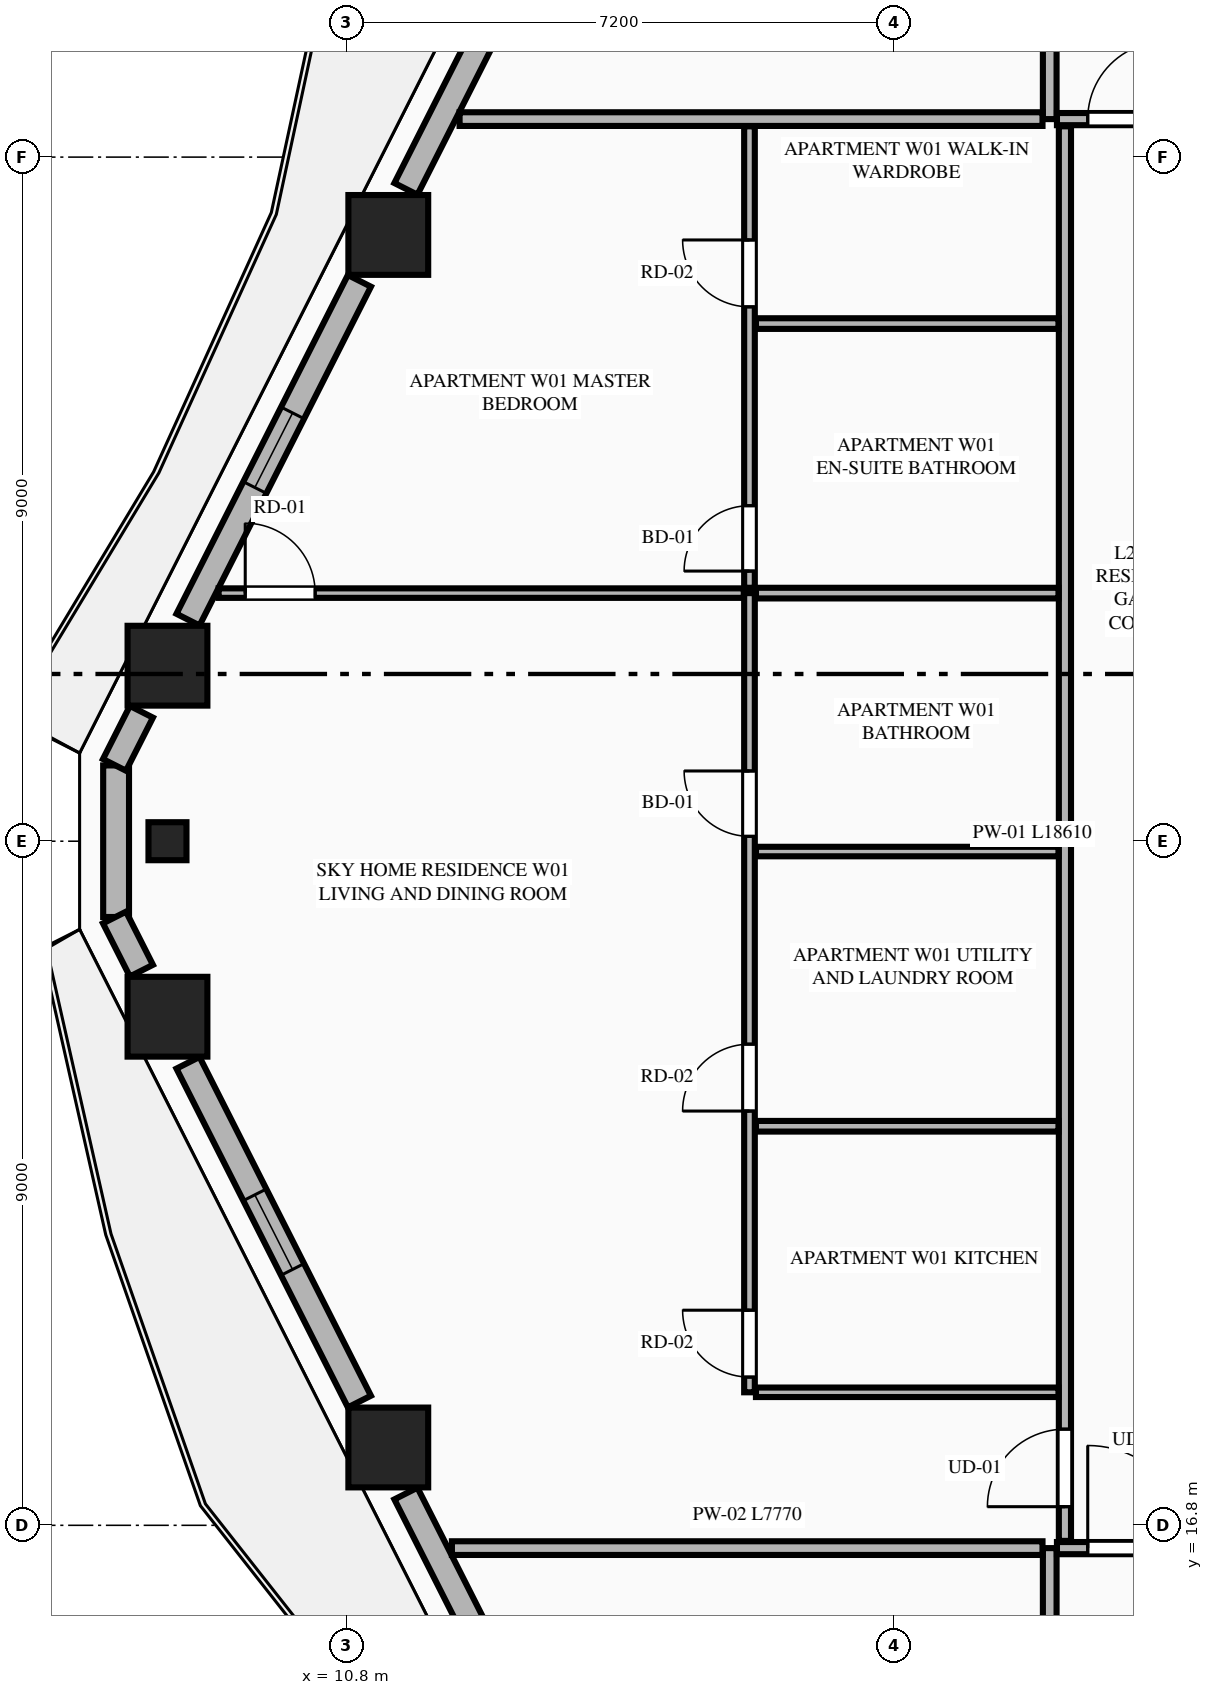
"""IFC4 building model, lengths in metres.
Left out: names, types, materials, properties, quantities, classifications, styles, units other than length and angle.
Written with IfcOpenShell. Run it as: python <this file> out.ifc"""

import sys

from ifc_helpers import new_model, si_unit, direction, frame, frame_2d, origin, origin_2d, place, context, subcontext, project, spatial, rectangle, extrude, element, fill, save


model = new_model("IFC4")
c1 = context("Model", 3, precision=1e-05, world=origin(), true_north=direction((0.0, 1.0)))
c2 = subcontext(c1, "Body", "Model", "MODEL_VIEW")
j1 = project(units=[si_unit("LENGTHUNIT", "METRE"), si_unit("PLANEANGLEUNIT", "RADIAN")], contexts=[c1])
p1 = place(None, origin())
s1 = spatial("IfcSite", under=j1, at=p1, CompositionType="ELEMENT")
p2 = place(p1, origin())
s2 = spatial("IfcBuilding", under=s1, at=p2, CompositionType="ELEMENT")
p3 = place(p2, frame((0.0, 0.0, 101.95)))
s3 = spatial("IfcBuildingStorey", under=s2, at=p3, CompositionType="ELEMENT", Elevation=101.95)
for number, where, z_axis, x_axis in (
    (1, (11.348, 33.776, 0.0), (0.0, 0.0, 1.0), (1.0, 0.0, 0.0)),
    (2, (8.443, 28.109, 0.0), (0.0, 0.0, 1.0), (1.0, 0.0, 0.0)),
    (3, (8.443, 23.491, 0.0), (0.0, 0.0, 1.0), (1.0, 0.0, 0.0)),
    (4, (11.348, 17.824, 0.0), (0.0, 0.0, 1.0), (1.0, 0.0, 0.0)),
):
    element("IfcColumn", number, at=place(p3, frame(where, z_axis=z_axis, x_axis=x_axis)), inside=s3, PredefinedType="COLUMN", context=c2, shape_type="SweptSolid", body=[
        extrude(rectangle(XDim=1.05, YDim=1.05, at=origin_2d()), origin(), (0.0, 0.0, 1.0), 3.55),
    ])
p4 = place(p3, frame((8.443, 25.8, 0.0), z_axis=(0.0, 0.0, 1.0), x_axis=(0.0, -1.0, 0.0)))
e5 = element("IfcColumn", 5, at=p4, inside=s3, PredefinedType="PILASTER", context=c2, shape_type="SweptSolid", body=[
    extrude(rectangle(XDim=0.5, YDim=0.35, at=origin_2d()), origin(), (0.0, 0.0, 1.0), 3.55),
])
p5 = place(p3, frame((7.767, 26.797, 0.0), z_axis=(0.0, 0.0, 1.0), x_axis=(0.0, -1.0, 0.0)))
e6 = element("IfcWall", 6, at=p5, inside=s3, PredefinedType="STANDARD", context=c2, shape_type="SweptSolid", body=[
    extrude(rectangle(XDim=1.994, YDim=0.34, at=frame_2d((0.997, 0.0))), origin(), (0.0, 0.0, 1.0), 3.34),
])
p6 = place(p3, frame((13.937, 39.039, 0.0), z_axis=(0.0, 0.0, 1.0), x_axis=(-0.451567731634, -0.892236842855, 0.0)))
e7 = element("IfcWall", 7, at=p6, inside=s3, PredefinedType="STANDARD", context=c2, shape_type="SweptSolid", body=[
    extrude(rectangle(XDim=5.219, YDim=0.34, at=frame_2d((2.61, 0.0))), origin(), (0.0, 0.0, 1.0), 2.797),
])
p7 = place(p6, frame((1.42, 0.0, 0.0)))
e8 = element("IfcOpeningElement", 8, at=p7, cuts=e7, PredefinedType="OPENING", context=c2, shape_type="SweptSolid", body=[
    extrude(rectangle(XDim=1.1, YDim=2.25, at=frame_2d((0.55, 1.125))), frame((0.0, 0.18, 0.0), z_axis=(0.0, -1.0, 0.0), x_axis=(1.0, 0.0, 0.0)), (0.0, 0.0, 1.0), 0.36),
])
p8 = place(p3, frame((10.968, 33.172, 0.0), z_axis=(0.0, 0.0, 1.0), x_axis=(-0.451470533039, -0.892286029139, 0.0)))
e9 = element("IfcWall", 9, at=p8, inside=s3, PredefinedType="STANDARD", context=c2, shape_type="SweptSolid", body=[
    extrude(rectangle(XDim=4.995, YDim=0.34, at=frame_2d((2.498, 0.0))), origin(), (0.0, 0.0, 1.0), 2.797),
])
p9 = place(p8, frame((1.947, 0.0, 0.75)))
e10 = element("IfcOpeningElement", 10, at=p9, cuts=e9, PredefinedType="OPENING", context=c2, shape_type="SweptSolid", body=[
    extrude(rectangle(XDim=1.1, YDim=1.897, at=frame_2d((0.55, 0.948))), frame((0.0, 0.18, 0.0), z_axis=(0.0, -1.0, 0.0), x_axis=(1.0, 0.0, 0.0)), (0.0, 0.0, 1.0), 0.36),
])
for number, where, z_axis, x_axis in (
    (11, (8.1, 27.503, 0.0), (0.0, 0.0, 1.0), (-0.452, -0.892, 0.0)),
    (12, (7.746, 24.796, 0.0), (0.0, 0.0, 1.0), (0.452, -0.892, 0.0)),
):
    element("IfcWall", number, at=place(p3, frame(where, z_axis=z_axis, x_axis=x_axis)), inside=s3, PredefinedType="STANDARD", context=c2, shape_type="SweptSolid", body=[
        extrude(rectangle(XDim=0.783, YDim=0.34, at=frame_2d((0.392, 0.0))), origin(), (0.0, 0.0, 1.0), 3.34),
    ])
p10 = place(p3, frame((8.713, 22.885, 0.0), z_axis=(0.0, 0.0, 1.0), x_axis=(0.451470533039, -0.892286029139, 0.0)))
e13 = element("IfcWall", 13, at=p10, inside=s3, PredefinedType="STANDARD", context=c2, shape_type="SweptSolid", body=[
    extrude(rectangle(XDim=4.995, YDim=0.34, at=frame_2d((2.498, 0.0))), origin(), (0.0, 0.0, 1.0), 2.797),
])
p11 = place(p10, frame((1.947, 0.0, 0.75)))
e14 = element("IfcOpeningElement", 14, at=p11, cuts=e13, PredefinedType="OPENING", context=c2, shape_type="SweptSolid", body=[
    extrude(rectangle(XDim=1.1, YDim=1.897, at=frame_2d((0.55, 0.948))), frame((0.0, 0.18, 0.0), z_axis=(0.0, -1.0, 0.0), x_axis=(1.0, 0.0, 0.0)), (0.0, 0.0, 1.0), 0.36),
])
p12 = place(p3, frame((11.58, 17.218, 0.0), z_axis=(0.0, 0.0, 1.0), x_axis=(0.451567731634, -0.892236842855, 0.0)))
e15 = element("IfcWall", 15, at=p12, inside=s3, PredefinedType="STANDARD", context=c2, shape_type="SweptSolid", body=[
    extrude(rectangle(XDim=5.219, YDim=0.34, at=frame_2d((2.61, 0.0))), origin(), (0.0, 0.0, 1.0), 2.797),
])
p13 = place(p12, frame((2.587, 0.0, 0.0)))
e16 = element("IfcOpeningElement", 16, at=p13, cuts=e15, PredefinedType="OPENING", context=c2, shape_type="SweptSolid", body=[
    extrude(rectangle(XDim=1.1, YDim=2.25, at=frame_2d((0.55, 1.125))), frame((0.0, 0.18, 0.0), z_axis=(0.0, -1.0, 0.0), x_axis=(1.0, 0.0, 0.0)), (0.0, 0.0, 1.0), 0.36),
])
p14 = place(p3, frame((20.05, 4.105, 0.0), z_axis=(0.0, 0.0, 1.0), x_axis=(0.0, 1.0, 0.0)))
e17 = element("IfcWall", 17, at=p14, inside=s3, PredefinedType="PARTITIONING", context=c2, shape_type="SweptSolid", body=[
    extrude(rectangle(XDim=12.395, YDim=0.18, at=frame_2d((6.198, 0.0))), origin(), (0.0, 0.0, 1.0), 3.34),
])
p15 = place(p3, frame((20.145, 16.5, 0.0), z_axis=(0.0, 0.0, 1.0), x_axis=(1.0, 0.0, 0.0)))
e18 = element("IfcWall", 18, at=p15, inside=s3, PredefinedType="PARTITIONING", context=c2, shape_type="SweptSolid", body=[
    extrude(rectangle(XDim=15.992, YDim=0.16, at=frame_2d((7.996, 0.0))), origin(), (0.0, 0.0, 1.0), 3.34),
])
p16 = place(p15, frame((0.405, 0.0, 0.0)))
e19 = element("IfcOpeningElement", 19, at=p16, cuts=e18, PredefinedType="OPENING", context=c2, shape_type="SweptSolid", body=[
    extrude(rectangle(XDim=1.35, YDim=2.35, at=frame_2d((0.675, 1.175))), frame((0.0, 0.09, 0.0), z_axis=(0.0, -1.0, 0.0), x_axis=(1.0, 0.0, 0.0)), (0.0, 0.0, 1.0), 0.18),
])
p17 = place(p3, frame((20.05, 35.3, 0.0), z_axis=(0.0, 0.0, 1.0), x_axis=(0.0, 1.0, 0.0)))
e20 = element("IfcWall", 20, at=p17, inside=s3, PredefinedType="PARTITIONING", context=c2, shape_type="SweptSolid", body=[
    extrude(rectangle(XDim=12.195, YDim=0.18, at=frame_2d((6.098, 0.0))), origin(), (0.0, 0.0, 1.0), 3.34),
])
p18 = place(p3, frame((20.145, 35.3, 0.0), z_axis=(0.0, 0.0, 1.0), x_axis=(1.0, 0.0, 0.0)))
e21 = element("IfcWall", 21, at=p18, inside=s3, PredefinedType="PARTITIONING", context=c2, shape_type="SweptSolid", body=[
    extrude(rectangle(XDim=8.328, YDim=0.16, at=frame_2d((4.164, 0.0))), origin(), (0.0, 0.0, 1.0), 3.34),
])
p19 = place(p18, frame((0.405, 0.0, 0.0)))
e22 = element("IfcOpeningElement", 22, at=p19, cuts=e21, PredefinedType="OPENING", context=c2, shape_type="SweptSolid", body=[
    extrude(rectangle(XDim=1.02, YDim=2.25, at=frame_2d((0.51, 1.125))), frame((0.0, 0.09, 0.0), z_axis=(0.0, -1.0, 0.0), x_axis=(1.0, 0.0, 0.0)), (0.0, 0.0, 1.0), 0.18),
])
p20 = place(p3, frame((12.185, 16.5, 0.0), z_axis=(0.0, 0.0, 1.0), x_axis=(1.0, 0.0, 0.0)))
e23 = element("IfcWall", 23, at=p20, inside=s3, PredefinedType="PARTITIONING", context=c2, shape_type="SweptSolid", body=[
    extrude(rectangle(XDim=7.77, YDim=0.18, at=frame_2d((3.885, 0.0))), origin(), (0.0, 0.0, 1.0), 3.34),
])
p21 = place(p3, frame((12.286, 35.3, 0.0), z_axis=(0.0, 0.0, 1.0), x_axis=(1.0, 0.0, 0.0)))
e24 = element("IfcWall", 24, at=p21, inside=s3, PredefinedType="PARTITIONING", context=c2, shape_type="SweptSolid", body=[
    extrude(rectangle(XDim=7.669, YDim=0.18, at=frame_2d((3.834, 0.0))), origin(), (0.0, 0.0, 1.0), 3.34),
])
p22 = place(p3, frame((20.25, 16.595, 0.0), z_axis=(0.0, 0.0, 1.0), x_axis=(0.0, 1.0, 0.0)))
e25 = element("IfcWall", 25, at=p22, inside=s3, PredefinedType="PARTITIONING", context=c2, shape_type="SweptSolid", body=[
    extrude(rectangle(XDim=18.61, YDim=0.16, at=frame_2d((9.305, 0.0))), origin(), (0.0, 0.0, 1.0), 3.34),
])
p23 = place(p22, frame((0.45, 0.0, 0.0)))
e26 = element("IfcOpeningElement", 26, at=p23, cuts=e25, PredefinedType="OPENING", context=c2, shape_type="SweptSolid", body=[
    extrude(rectangle(XDim=1.02, YDim=2.25, at=frame_2d((0.51, 1.125))), frame((0.0, 0.09, 0.0), z_axis=(0.0, -1.0, 0.0), x_axis=(1.0, 0.0, 0.0)), (0.0, 0.0, 1.0), 0.18),
])
p24 = place(p3, frame((16.185, 18.55, 0.0), z_axis=(0.0, 0.0, 1.0), x_axis=(1.0, 0.0, 0.0)))
e27 = element("IfcWall", 27, at=p24, inside=s3, PredefinedType="PARTITIONING", context=c2, shape_type="SweptSolid", body=[
    extrude(rectangle(XDim=3.98, YDim=0.125, at=frame_2d((1.99, 0.0))), origin(), (0.0, 0.0, 1.0), 2.722),
])
p25 = place(p3, frame((16.1, 18.55, 0.0), z_axis=(0.0, 0.0, 1.0), x_axis=(0.0, 1.0, 0.0)))
e28 = element("IfcWall", 28, at=p25, inside=s3, PredefinedType="PLUMBINGWALL", context=c2, shape_type="SweptSolid", body=[
    extrude(rectangle(XDim=10.514, YDim=0.14, at=frame_2d((5.257, 0.0))), origin(), (0.0, 0.0, 1.0), 3.34),
])
p26 = place(p25, frame((0.2, 0.0, 0.0)))
e29 = element("IfcOpeningElement", 29, at=p26, cuts=e28, PredefinedType="OPENING", context=c2, shape_type="SweptSolid", body=[
    extrude(rectangle(XDim=0.88, YDim=2.15, at=frame_2d((0.44, 1.075))), frame((0.0, 0.08, 0.0), z_axis=(0.0, -1.0, 0.0), x_axis=(1.0, 0.0, 0.0)), (0.0, 0.0, 1.0), 0.16),
])
p27 = place(p25, frame((3.7, 0.0, 0.0)))
e30 = element("IfcOpeningElement", 30, at=p27, cuts=e28, PredefinedType="OPENING", context=c2, shape_type="SweptSolid", body=[
    extrude(rectangle(XDim=0.88, YDim=2.15, at=frame_2d((0.44, 1.075))), frame((0.0, 0.08, 0.0), z_axis=(0.0, -1.0, 0.0), x_axis=(1.0, 0.0, 0.0)), (0.0, 0.0, 1.0), 0.16),
])
p28 = place(p25, frame((7.314, 0.0, 0.0)))
e31 = element("IfcOpeningElement", 31, at=p28, cuts=e28, PredefinedType="OPENING", context=c2, shape_type="SweptSolid", body=[
    extrude(rectangle(XDim=0.86, YDim=2.1, at=frame_2d((0.43, 1.05))), frame((0.0, 0.08, 0.0), z_axis=(0.0, -1.0, 0.0), x_axis=(1.0, 0.0, 0.0)), (0.0, 0.0, 1.0), 0.16),
])
p29 = place(p3, frame((16.1, 29.134, 0.0), z_axis=(0.0, 0.0, 1.0), x_axis=(0.0, 1.0, 0.0)))
e32 = element("IfcWall", 32, at=p29, inside=s3, PredefinedType="PLUMBINGWALL", context=c2, shape_type="SweptSolid", body=[
    extrude(rectangle(XDim=6.071, YDim=0.14, at=frame_2d((3.036, 0.0))), origin(), (0.0, 0.0, 1.0), 3.34),
])
p30 = place(p29, frame((0.22, 0.0, 0.0)))
e33 = element("IfcOpeningElement", 33, at=p30, cuts=e32, PredefinedType="OPENING", context=c2, shape_type="SweptSolid", body=[
    extrude(rectangle(XDim=0.86, YDim=2.1, at=frame_2d((0.43, 1.05))), frame((0.0, 0.08, 0.0), z_axis=(0.0, -1.0, 0.0), x_axis=(1.0, 0.0, 0.0)), (0.0, 0.0, 1.0), 0.16),
])
p31 = place(p29, frame((3.696, 0.0, 0.0)))
e34 = element("IfcOpeningElement", 34, at=p31, cuts=e32, PredefinedType="OPENING", context=c2, shape_type="SweptSolid", body=[
    extrude(rectangle(XDim=0.88, YDim=2.15, at=frame_2d((0.44, 1.075))), frame((0.0, 0.08, 0.0), z_axis=(0.0, -1.0, 0.0), x_axis=(1.0, 0.0, 0.0)), (0.0, 0.0, 1.0), 0.16),
])
p32 = place(p3, frame((16.185, 29.064, 0.0), z_axis=(0.0, 0.0, 1.0), x_axis=(1.0, 0.0, 0.0)))
e35 = element("IfcWall", 35, at=p32, inside=s3, PredefinedType="PLUMBINGWALL", context=c2, shape_type="SweptSolid", body=[
    extrude(rectangle(XDim=3.98, YDim=0.14, at=frame_2d((1.99, 0.0))), origin(), (0.0, 0.0, 1.0), 3.34),
])
p33 = place(p3, frame((9.116, 29.064, 0.0), z_axis=(0.0, 0.0, 1.0), x_axis=(1.0, 0.0, 0.0)))
e36 = element("IfcWall", 36, at=p33, inside=s3, PredefinedType="PARTITIONING", context=c2, shape_type="SweptSolid", body=[
    extrude(rectangle(XDim=6.909, YDim=0.125, at=frame_2d((3.455, 0.0))), origin(), (0.0, 0.0, 1.0), 3.34),
])
p34 = place(p33, frame((0.35, 0.0, 0.0)))
e37 = element("IfcOpeningElement", 37, at=p34, cuts=e36, PredefinedType="OPENING", context=c2, shape_type="SweptSolid", body=[
    extrude(rectangle(XDim=0.92, YDim=2.15, at=frame_2d((0.46, 1.075))), frame((0.0, 0.073, 0.0), z_axis=(0.0, -1.0, 0.0), x_axis=(1.0, 0.0, 0.0)), (0.0, 0.0, 1.0), 0.145),
])
p35 = place(p3, frame((16.185, 22.05, 0.0), z_axis=(0.0, 0.0, 1.0), x_axis=(1.0, 0.0, 0.0)))
e38 = element("IfcWall", 38, at=p35, inside=s3, PredefinedType="PLUMBINGWALL", context=c2, shape_type="SweptSolid", body=[
    extrude(rectangle(XDim=3.98, YDim=0.14, at=frame_2d((1.99, 0.0))), origin(), (0.0, 0.0, 1.0), 3.34),
])
p36 = place(p3, frame((16.185, 25.664, 0.0), z_axis=(0.0, 0.0, 1.0), x_axis=(1.0, 0.0, 0.0)))
e39 = element("IfcWall", 39, at=p36, inside=s3, PredefinedType="PARTITIONING", context=c2, shape_type="SweptSolid", body=[
    extrude(rectangle(XDim=3.98, YDim=0.125, at=frame_2d((1.99, 0.0))), origin(), (0.0, 0.0, 1.0), 3.34),
])
p37 = place(p3, frame((16.185, 32.61, 0.0), z_axis=(0.0, 0.0, 1.0), x_axis=(1.0, 0.0, 0.0)))
e40 = element("IfcWall", 40, at=p37, inside=s3, PredefinedType="PLUMBINGWALL", context=c2, shape_type="SweptSolid", body=[
    extrude(rectangle(XDim=3.98, YDim=0.14, at=frame_2d((1.99, 0.0))), origin(), (0.0, 0.0, 1.0), 3.34),
])
p38 = place(p9, origin())
e41 = element("IfcWindow", 41, at=p38, inside=s3, PartitioningType="SINGLE_PANEL", PredefinedType="WINDOW", context=c2, shape_type="SweptSolid", body=[
    extrude(rectangle(XDim=1.1, YDim=1.897, at=frame_2d((0.55, 0.948))), frame((0.0, 0.03, 0.0), z_axis=(0.0, -1.0, 0.0), x_axis=(1.0, 0.0, 0.0)), (0.0, 0.0, 1.0), 0.06),
])
fill(e10, e41)
p39 = place(p11, origin())
e42 = element("IfcWindow", 42, at=p39, inside=s3, PartitioningType="SINGLE_PANEL", PredefinedType="WINDOW", context=c2, shape_type="SweptSolid", body=[
    extrude(rectangle(XDim=1.1, YDim=1.897, at=frame_2d((0.55, 0.948))), frame((0.0, 0.03, 0.0), z_axis=(0.0, -1.0, 0.0), x_axis=(1.0, 0.0, 0.0)), (0.0, 0.0, 1.0), 0.06),
])
fill(e14, e42)
p40 = place(p16, origin())
e43 = element("IfcDoor", 43, at=p40, inside=s3, OperationType="SINGLE_SWING_LEFT", PredefinedType="DOOR", context=c2, shape_type="SweptSolid", body=[
    extrude(rectangle(XDim=1.35, YDim=2.35, at=frame_2d((0.675, 1.175))), frame((0.0, 0.025, 0.0), z_axis=(0.0, -1.0, 0.0), x_axis=(1.0, 0.0, 0.0)), (0.0, 0.0, 1.0), 0.05),
])
fill(e19, e43)
p41 = place(p19, origin())
e44 = element("IfcDoor", 44, at=p41, inside=s3, OperationType="SINGLE_SWING_RIGHT", PredefinedType="DOOR", context=c2, shape_type="SweptSolid", body=[
    extrude(rectangle(XDim=1.02, YDim=2.25, at=frame_2d((0.51, 1.125))), frame((0.0, 0.025, 0.0), z_axis=(0.0, -1.0, 0.0), x_axis=(1.0, 0.0, 0.0)), (0.0, 0.0, 1.0), 0.05),
])
fill(e22, e44)
p42 = place(p26, origin())
e45 = element("IfcDoor", 45, at=p42, inside=s3, OperationType="SINGLE_SWING_RIGHT", PredefinedType="DOOR", context=c2, shape_type="SweptSolid", body=[
    extrude(rectangle(XDim=0.88, YDim=2.15, at=frame_2d((0.44, 1.075))), frame((0.0, 0.025, 0.0), z_axis=(0.0, -1.0, 0.0), x_axis=(1.0, 0.0, 0.0)), (0.0, 0.0, 1.0), 0.05),
])
fill(e29, e45)
p43 = place(p27, origin())
e46 = element("IfcDoor", 46, at=p43, inside=s3, OperationType="SINGLE_SWING_LEFT", PredefinedType="DOOR", context=c2, shape_type="SweptSolid", body=[
    extrude(rectangle(XDim=0.88, YDim=2.15, at=frame_2d((0.44, 1.075))), frame((0.0, 0.025, 0.0), z_axis=(0.0, -1.0, 0.0), x_axis=(1.0, 0.0, 0.0)), (0.0, 0.0, 1.0), 0.05),
])
fill(e30, e46)
p44 = place(p28, origin())
e47 = element("IfcDoor", 47, at=p44, inside=s3, OperationType="SINGLE_SWING_RIGHT", PredefinedType="DOOR", context=c2, shape_type="SweptSolid", body=[
    extrude(rectangle(XDim=0.86, YDim=2.1, at=frame_2d((0.43, 1.05))), frame((0.0, 0.025, 0.0), z_axis=(0.0, -1.0, 0.0), x_axis=(1.0, 0.0, 0.0)), (0.0, 0.0, 1.0), 0.05),
])
fill(e31, e47)
p45 = place(p30, origin())
e48 = element("IfcDoor", 48, at=p45, inside=s3, OperationType="SINGLE_SWING_LEFT", PredefinedType="DOOR", context=c2, shape_type="SweptSolid", body=[
    extrude(rectangle(XDim=0.86, YDim=2.1, at=frame_2d((0.43, 1.05))), frame((0.0, 0.025, 0.0), z_axis=(0.0, -1.0, 0.0), x_axis=(1.0, 0.0, 0.0)), (0.0, 0.0, 1.0), 0.05),
])
fill(e33, e48)
p46 = place(p31, origin())
e49 = element("IfcDoor", 49, at=p46, inside=s3, OperationType="SINGLE_SWING_RIGHT", PredefinedType="DOOR", context=c2, shape_type="SweptSolid", body=[
    extrude(rectangle(XDim=0.88, YDim=2.15, at=frame_2d((0.44, 1.075))), frame((0.0, 0.025, 0.0), z_axis=(0.0, -1.0, 0.0), x_axis=(1.0, 0.0, 0.0)), (0.0, 0.0, 1.0), 0.05),
])
fill(e34, e49)
p47 = place(p23, origin())
e50 = element("IfcDoor", 50, at=p47, inside=s3, OperationType="SINGLE_SWING_LEFT", PredefinedType="DOOR", context=c2, shape_type="SweptSolid", body=[
    extrude(rectangle(XDim=1.02, YDim=2.25, at=frame_2d((0.51, 1.125))), frame((0.0, 0.025, 0.0), z_axis=(0.0, -1.0, 0.0), x_axis=(1.0, 0.0, 0.0)), (0.0, 0.0, 1.0), 0.05),
])
fill(e26, e50)
p48 = place(p34, origin())
e51 = element("IfcDoor", 51, at=p48, inside=s3, OperationType="SINGLE_SWING_LEFT", PredefinedType="DOOR", context=c2, shape_type="SweptSolid", body=[
    extrude(rectangle(XDim=0.92, YDim=2.15, at=frame_2d((0.46, 1.075))), frame((0.0, 0.025, 0.0), z_axis=(0.0, -1.0, 0.0), x_axis=(1.0, 0.0, 0.0)), (0.0, 0.0, 1.0), 0.05),
])
fill(e37, e51)
save(model, sys.argv[1])
